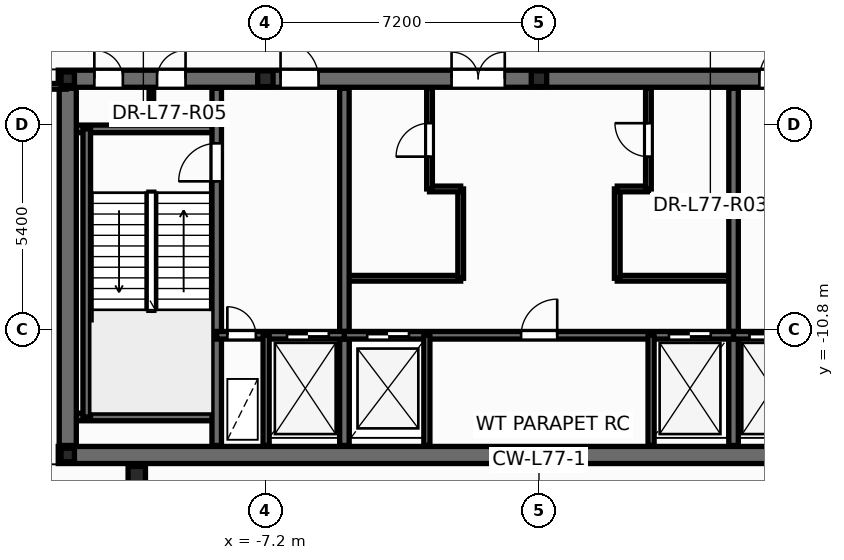
"""IFC4 building model, lengths in metres.
Left out: names, types, materials, properties, quantities, classifications, styles, units other than length and angle.
Written with IfcOpenShell. Run it as: python <this file> out.ifc"""

import sys

from ifc_helpers import new_model, si_unit, direction, frame, frame_2d, origin, origin_2d, place, context, subcontext, project, spatial, rectangle, hollow_circle, i_section, extrude, element, fill, save


model = new_model("IFC4")
c1 = context("Model", 3, precision=1e-05, world=origin(), true_north=direction((0.0, 1.0)))
c2 = subcontext(c1, "Body", "Model", "MODEL_VIEW")
j1 = project(units=[si_unit("LENGTHUNIT", "METRE"), si_unit("PLANEANGLEUNIT", "RADIAN")], contexts=[c1])
p1 = place(None, origin())
s1 = spatial("IfcSite", under=j1, at=p1, CompositionType="ELEMENT")
p2 = place(p1, origin())
s2 = spatial("IfcBuilding", under=s1, at=p2, CompositionType="ELEMENT")
p3 = place(p2, frame((0.0, 0.0, 293.4)))
s3 = spatial("IfcBuildingStorey", under=s2, at=p3, CompositionType="ELEMENT", Elevation=293.4)
p4 = place(p3, frame((-10.583, -14.63, 0.0), z_axis=(0.0, 0.0, 1.0), x_axis=(1.0, 0.0, 0.0)))
e1 = element("IfcColumn", 1, at=p4, inside=s3, PredefinedType="COLUMN", context=c2, shape_type="SweptSolid", body=[
    extrude(hollow_circle(Radius=0.229, WallThickness=0.016, at=origin_2d()), origin(), (0.0, 0.0, 1.0), 4.2),
])
for number, where, z_axis, x_axis in (
    (2, (-12.4, -14.1, 0.0), (0.0, 0.0, 1.0), (1.0, 0.0, 0.0)),
    (3, (-12.4, -4.2, 0.0), (0.0, 0.0, 1.0), (1.0, 0.0, 0.0)),
):
    element("IfcColumn", number, at=place(p3, frame(where, z_axis=z_axis, x_axis=x_axis)), inside=s3, PredefinedType="COLUMN", context=c2, shape_type="SweptSolid", body=[
        extrude(i_section(OverallWidth=0.352, OverallDepth=0.359, WebThickness=0.018, FlangeThickness=0.026, at=origin_2d()), origin(), (0.0, 0.0, 1.0), 4.2),
    ])
for number, where, z_axis, x_axis in (
    (4, (-7.2, -4.2, 0.0), (0.0, 0.0, 1.0), (1.0, 0.0, 0.0)),
    (5, (0.0, -4.2, 0.0), (0.0, 0.0, 1.0), (1.0, 0.0, 0.0)),
):
    element("IfcColumn", number, at=place(p3, frame(where, z_axis=z_axis, x_axis=x_axis)), inside=s3, PredefinedType="PILASTER", context=c2, shape_type="SweptSolid", body=[
        extrude(i_section(OverallWidth=0.405, OverallDepth=0.414, WebThickness=0.022, FlangeThickness=0.032, at=origin_2d()), origin(), (0.0, 0.0, 1.0), 4.2),
    ])
p5 = place(p3, frame((15.285, -4.406, -0.2), z_axis=(0.0, 0.0, 1.0), x_axis=(-0.580762496963, 0.814073044709, 0.0)))
e6 = element("IfcWall", 6, at=p5, inside=s3, PredefinedType="PARAPET", context=c2, shape_type="SweptSolid", body=[
    extrude(rectangle(XDim=23.163, YDim=0.36, at=frame_2d((11.581, 0.0))), origin(), (0.0, 0.0, 1.0), 0.38),
])
p6 = place(p3, frame((-11.155, 1.383, -0.2), z_axis=(0.0, 0.0, 1.0), x_axis=(-0.580765612452, -0.814070822099, 0.0)))
e7 = element("IfcWall", 7, at=p6, inside=s3, PredefinedType="PARAPET", context=c2, shape_type="SweptSolid", body=[
    extrude(rectangle(XDim=17.156, YDim=0.36, at=frame_2d((8.578, 0.0))), origin(), (0.0, 0.0, 1.0), 0.38),
])
p7 = place(p3, frame((-5.12, -9.45, 0.0), z_axis=(0.0, 0.0, 1.0), x_axis=(1.0, 0.0, 0.0)))
e8 = element("IfcWall", 8, at=p7, inside=s3, PredefinedType="PARTITIONING", context=c2, shape_type="SweptSolid", body=[
    extrude(rectangle(XDim=3.06, YDim=0.15, at=frame_2d((1.53, 0.0))), origin(), (0.0, 0.0, 1.0), 3.88),
])
p8 = place(p3, frame((-2.06, -9.45, 0.0), z_axis=(0.0, 0.0, 1.0), x_axis=(0.0, 1.0, 0.0)))
e9 = element("IfcWall", 9, at=p8, inside=s3, PredefinedType="PARTITIONING", context=c2, shape_type="SweptSolid", body=[
    extrude(rectangle(XDim=2.35, YDim=0.15, at=frame_2d((1.175, 0.0))), origin(), (0.0, 0.0, 1.0), 3.88),
])
p9 = place(p3, frame((-2.88, -7.1, 0.0), z_axis=(0.0, 0.0, 1.0), x_axis=(1.0, 0.0, 0.0)))
e10 = element("IfcWall", 10, at=p9, inside=s3, PredefinedType="PARTITIONING", context=c2, shape_type="SweptSolid", body=[
    extrude(rectangle(XDim=0.82, YDim=0.15, at=frame_2d((0.41, 0.0))), origin(), (0.0, 0.0, 1.0), 3.88),
])
p10 = place(p3, frame((-2.88, -7.1, 0.0), z_axis=(0.0, 0.0, 1.0), x_axis=(0.0, 1.0, 0.0)))
e11 = element("IfcWall", 11, at=p10, inside=s3, PredefinedType="PARTITIONING", context=c2, shape_type="SweptSolid", body=[
    extrude(rectangle(XDim=2.65, YDim=0.15, at=frame_2d((1.325, 0.0))), origin(), (0.0, 0.0, 1.0), 3.88),
])
p11 = place(p10, frame((0.85, 0.0, 0.0)))
e12 = element("IfcOpeningElement", 12, at=p11, cuts=e11, PredefinedType="OPENING", context=c2, shape_type="SweptSolid", body=[
    extrude(rectangle(XDim=0.886, YDim=2.104, at=frame_2d((0.44, 1.052))), frame((0.0, 0.085, 0.0), z_axis=(0.0, -1.0, 0.0), x_axis=(1.0, 0.0, 0.0)), (0.0, 0.0, 1.0), 0.17),
])
p12 = place(p3, frame((2.06, -9.45, 0.0), z_axis=(0.0, 0.0, 1.0), x_axis=(1.0, 0.0, 0.0)))
e13 = element("IfcWall", 13, at=p12, inside=s3, PredefinedType="PARTITIONING", context=c2, shape_type="SweptSolid", body=[
    extrude(rectangle(XDim=3.06, YDim=0.15, at=frame_2d((1.53, 0.0))), origin(), (0.0, 0.0, 1.0), 3.88),
])
p13 = place(p3, frame((2.06, -9.45, 0.0), z_axis=(0.0, 0.0, 1.0), x_axis=(0.0, 1.0, 0.0)))
e14 = element("IfcWall", 14, at=p13, inside=s3, PredefinedType="PARTITIONING", context=c2, shape_type="SweptSolid", body=[
    extrude(rectangle(XDim=2.35, YDim=0.15, at=frame_2d((1.175, 0.0))), origin(), (0.0, 0.0, 1.0), 3.88),
])
p14 = place(p3, frame((2.06, -7.1, 0.0), z_axis=(0.0, 0.0, 1.0), x_axis=(1.0, 0.0, 0.0)))
e15 = element("IfcWall", 15, at=p14, inside=s3, PredefinedType="PARTITIONING", context=c2, shape_type="SweptSolid", body=[
    extrude(rectangle(XDim=0.82, YDim=0.15, at=frame_2d((0.41, 0.0))), origin(), (0.0, 0.0, 1.0), 3.88),
])
p15 = place(p3, frame((2.88, -7.1, 0.0), z_axis=(0.0, 0.0, 1.0), x_axis=(0.0, 1.0, 0.0)))
e16 = element("IfcWall", 16, at=p15, inside=s3, PredefinedType="PARTITIONING", context=c2, shape_type="SweptSolid", body=[
    extrude(rectangle(XDim=2.65, YDim=0.15, at=frame_2d((1.325, 0.0))), origin(), (0.0, 0.0, 1.0), 3.88),
])
p16 = place(p15, frame((0.85, 0.0, 0.0)))
e17 = element("IfcOpeningElement", 17, at=p16, cuts=e16, PredefinedType="OPENING", context=c2, shape_type="SweptSolid", body=[
    extrude(rectangle(XDim=0.886, YDim=2.104, at=frame_2d((0.44, 1.052))), frame((0.0, 0.085, 0.0), z_axis=(0.0, -1.0, 0.0), x_axis=(1.0, 0.0, 0.0)), (0.0, 0.0, 1.0), 0.17),
])
p17 = place(p3, frame((-10.2, -5.52, 0.0), z_axis=(0.0, 0.0, 1.0), x_axis=(0.0, 1.0, 0.0)))
e18 = element("IfcWall", 18, at=p17, inside=s3, PredefinedType="PARTITIONING", context=c2, shape_type="SweptSolid", body=[
    extrude(rectangle(XDim=1.12, YDim=0.12, at=frame_2d((0.56, 0.0))), origin(), (0.0, 0.0, 1.0), 3.88),
])
p18 = place(p3, frame((-12.65, -14.1, 0.0), z_axis=(0.0, 0.0, 1.0), x_axis=(1.0, 0.0, 0.0)))
e19 = element("IfcWall", 19, at=p18, inside=s3, PredefinedType="SHEAR", context=c2, shape_type="SweptSolid", body=[
    extrude(rectangle(XDim=25.3, YDim=0.45, at=frame_2d((12.65, 0.0))), origin(), (0.0, 0.0, 1.0), 4.2),
])
p19 = place(p3, frame((-12.65, -4.2, 0.0), z_axis=(0.0, 0.0, 1.0), x_axis=(1.0, 0.0, 0.0)))
e20 = element("IfcWall", 20, at=p19, inside=s3, PredefinedType="SHEAR", context=c2, shape_type="SweptSolid", body=[
    extrude(rectangle(XDim=25.3, YDim=0.45, at=frame_2d((12.65, 0.0))), origin(), (0.0, 0.0, 1.0), 4.2),
])
p20 = place(p19, frame((0.95, 0.0, 0.0)))
e21 = element("IfcOpeningElement", 21, at=p20, cuts=e20, PredefinedType="OPENING", context=c2, shape_type="SweptSolid", body=[
    extrude(rectangle(XDim=0.756, YDim=2.054, at=frame_2d((0.375, 1.027))), frame((0.0, 0.235, 0.0), z_axis=(0.0, -1.0, 0.0), x_axis=(1.0, 0.0, 0.0)), (0.0, 0.0, 1.0), 0.47),
])
p21 = place(p19, frame((2.6, 0.0, 0.0)))
e22 = element("IfcOpeningElement", 22, at=p21, cuts=e20, PredefinedType="OPENING", context=c2, shape_type="SweptSolid", body=[
    extrude(rectangle(XDim=0.756, YDim=2.054, at=frame_2d((0.375, 1.027))), frame((0.0, 0.235, 0.0), z_axis=(0.0, -1.0, 0.0), x_axis=(1.0, 0.0, 0.0)), (0.0, 0.0, 1.0), 0.47),
])
p22 = place(p19, frame((21.85, 0.0, 0.0)))
e23 = element("IfcOpeningElement", 23, at=p22, cuts=e20, PredefinedType="OPENING", context=c2, shape_type="SweptSolid", body=[
    extrude(rectangle(XDim=0.756, YDim=2.054, at=frame_2d((0.375, 1.027))), frame((0.0, 0.235, 0.0), z_axis=(0.0, -1.0, 0.0), x_axis=(1.0, 0.0, 0.0)), (0.0, 0.0, 1.0), 0.47),
])
p23 = place(p19, frame((23.5, 0.0, 0.0)))
e24 = element("IfcOpeningElement", 24, at=p23, cuts=e20, PredefinedType="OPENING", context=c2, shape_type="SweptSolid", body=[
    extrude(rectangle(XDim=0.756, YDim=2.054, at=frame_2d((0.375, 1.027))), frame((0.0, 0.235, 0.0), z_axis=(0.0, -1.0, 0.0), x_axis=(1.0, 0.0, 0.0)), (0.0, 0.0, 1.0), 0.47),
])
p24 = place(p19, frame((5.85, 0.0, 0.0)))
e25 = element("IfcOpeningElement", 25, at=p24, cuts=e20, PredefinedType="OPENING", context=c2, shape_type="SweptSolid", body=[
    extrude(rectangle(XDim=1.006, YDim=2.104, at=frame_2d((0.5, 1.052))), frame((0.0, 0.235, 0.0), z_axis=(0.0, -1.0, 0.0), x_axis=(1.0, 0.0, 0.0)), (0.0, 0.0, 1.0), 0.47),
])
p25 = place(p19, frame((10.35, 0.0, 0.0)))
e26 = element("IfcOpeningElement", 26, at=p25, cuts=e20, PredefinedType="OPENING", context=c2, shape_type="SweptSolid", body=[
    extrude(rectangle(XDim=1.406, YDim=2.154, at=frame_2d((0.7, 1.077))), frame((0.0, 0.235, 0.0), z_axis=(0.0, -1.0, 0.0), x_axis=(1.0, 0.0, 0.0)), (0.0, 0.0, 1.0), 0.47),
])
p26 = place(p19, frame((18.45, 0.0, 0.0)))
e27 = element("IfcOpeningElement", 27, at=p26, cuts=e20, PredefinedType="OPENING", context=c2, shape_type="SweptSolid", body=[
    extrude(rectangle(XDim=1.006, YDim=2.104, at=frame_2d((0.5, 1.052))), frame((0.0, 0.235, 0.0), z_axis=(0.0, -1.0, 0.0), x_axis=(1.0, 0.0, 0.0)), (0.0, 0.0, 1.0), 0.47),
])
for number, where, z_axis, x_axis in (
    (28, (-12.35, -5.52, 0.0), (0.0, 0.0, 1.0), (1.0, 0.0, 0.0)),
    (29, (-12.35, -13.1, 0.0), (0.0, 0.0, 1.0), (1.0, 0.0, 0.0)),
):
    element("IfcWall", number, at=place(p3, frame(where, z_axis=z_axis, x_axis=x_axis)), inside=s3, PredefinedType="SOLIDWALL", context=c2, shape_type="SweptSolid", body=[
        extrude(rectangle(XDim=3.87, YDim=0.2, at=frame_2d((1.935, 0.0))), origin(), (0.0, 0.0, 1.0), 4.2),
    ])
p27 = place(p3, frame((-11.9, -13.1, 0.0), z_axis=(0.0, 0.0, 1.0), x_axis=(0.0, 1.0, 0.0)))
e30 = element("IfcWall", 30, at=p27, inside=s3, PredefinedType="SOLIDWALL", context=c2, shape_type="SweptSolid", body=[
    extrude(rectangle(XDim=7.58, YDim=0.2, at=frame_2d((3.79, 0.0))), origin(), (0.0, 0.0, 1.0), 4.2),
])
p28 = place(p3, frame((-8.48, -13.85, 0.0), z_axis=(0.0, 0.0, 1.0), x_axis=(0.0, 1.0, 0.0)))
e31 = element("IfcWall", 31, at=p28, inside=s3, PredefinedType="SHEAR", context=c2, shape_type="SweptSolid", body=[
    extrude(rectangle(XDim=9.4, YDim=0.25, at=frame_2d((4.7, 0.0))), origin(), (0.0, 0.0, 1.0), 4.2),
])
p29 = place(p28, frame((6.95, 0.0, 0.0)))
e32 = element("IfcOpeningElement", 32, at=p29, cuts=e31, PredefinedType="OPENING", context=c2, shape_type="SweptSolid", body=[
    extrude(rectangle(XDim=1.006, YDim=2.104, at=frame_2d((0.5, 1.052))), frame((0.0, 0.135, 0.0), z_axis=(0.0, -1.0, 0.0), x_axis=(1.0, 0.0, 0.0)), (0.0, 0.0, 1.0), 0.27),
])
for number, where, z_axis, x_axis in (
    (33, (-5.12, -13.85, 0.0), (0.0, 0.0, 1.0), (0.0, 1.0, 0.0)),
    (34, (5.12, -13.85, 0.0), (0.0, 0.0, 1.0), (0.0, 1.0, 0.0)),
):
    element("IfcWall", number, at=place(p3, frame(where, z_axis=z_axis, x_axis=x_axis)), inside=s3, PredefinedType="SHEAR", context=c2, shape_type="SweptSolid", body=[
        extrude(rectangle(XDim=9.4, YDim=0.25, at=frame_2d((4.7, 0.0))), origin(), (0.0, 0.0, 1.0), 4.2),
    ])
p30 = place(p3, frame((-8.48, -10.95, 0.0), z_axis=(0.0, 0.0, 1.0), x_axis=(1.0, 0.0, 0.0)))
e35 = element("IfcWall", 35, at=p30, inside=s3, PredefinedType="SOLIDWALL", context=c2, shape_type="SweptSolid", body=[
    extrude(rectangle(XDim=3.36, YDim=0.2, at=frame_2d((1.68, 0.0))), origin(), (0.0, 0.0, 1.0), 4.2),
])
p31 = place(p30, frame((0.28, 0.0, 0.0)))
e36 = element("IfcOpeningElement", 36, at=p31, cuts=e35, PredefinedType="OPENING", context=c2, shape_type="SweptSolid", body=[
    extrude(rectangle(XDim=0.756, YDim=2.054, at=frame_2d((0.375, 1.027))), frame((0.0, 0.11, 0.0), z_axis=(0.0, -1.0, 0.0), x_axis=(1.0, 0.0, 0.0)), (0.0, 0.0, 1.0), 0.22),
])
p32 = place(p30, frame((1.85, 0.0, 0.0)))
e37 = element("IfcOpeningElement", 37, at=p32, cuts=e35, PredefinedType="OPENING", context=c2, shape_type="SweptSolid", body=[
    extrude(rectangle(XDim=1.106, YDim=2.104, at=frame_2d((0.55, 1.052))), frame((0.0, 0.11, 0.0), z_axis=(0.0, -1.0, 0.0), x_axis=(1.0, 0.0, 0.0)), (0.0, 0.0, 1.0), 0.22),
])
p33 = place(p3, frame((-5.12, -10.95, 0.0), z_axis=(0.0, 0.0, 1.0), x_axis=(1.0, 0.0, 0.0)))
e38 = element("IfcWall", 38, at=p33, inside=s3, PredefinedType="SOLIDWALL", context=c2, shape_type="SweptSolid", body=[
    extrude(rectangle(XDim=10.24, YDim=0.2, at=frame_2d((5.12, 0.0))), origin(), (0.0, 0.0, 1.0), 4.2),
])
p34 = place(p33, frame((0.6, 0.0, 0.0)))
e39 = element("IfcOpeningElement", 39, at=p34, cuts=e38, PredefinedType="OPENING", context=c2, shape_type="SweptSolid", body=[
    extrude(rectangle(XDim=1.106, YDim=2.104, at=frame_2d((0.55, 1.052))), frame((0.0, 0.11, 0.0), z_axis=(0.0, -1.0, 0.0), x_axis=(1.0, 0.0, 0.0)), (0.0, 0.0, 1.0), 0.22),
])
p35 = place(p33, frame((4.65, 0.0, 0.0)))
e40 = element("IfcOpeningElement", 40, at=p35, cuts=e38, PredefinedType="OPENING", context=c2, shape_type="SweptSolid", body=[
    extrude(rectangle(XDim=0.956, YDim=2.104, at=frame_2d((0.475, 1.052))), frame((0.0, 0.11, 0.0), z_axis=(0.0, -1.0, 0.0), x_axis=(1.0, 0.0, 0.0)), (0.0, 0.0, 1.0), 0.22),
])
p36 = place(p33, frame((8.54, 0.0, 0.0)))
e41 = element("IfcOpeningElement", 41, at=p36, cuts=e38, PredefinedType="OPENING", context=c2, shape_type="SweptSolid", body=[
    extrude(rectangle(XDim=1.106, YDim=2.104, at=frame_2d((0.55, 1.052))), frame((0.0, 0.11, 0.0), z_axis=(0.0, -1.0, 0.0), x_axis=(1.0, 0.0, 0.0)), (0.0, 0.0, 1.0), 0.22),
])
p37 = place(p3, frame((5.12, -10.95, 0.0), z_axis=(0.0, 0.0, 1.0), x_axis=(1.0, 0.0, 0.0)))
e42 = element("IfcWall", 42, at=p37, inside=s3, PredefinedType="SOLIDWALL", context=c2, shape_type="SweptSolid", body=[
    extrude(rectangle(XDim=3.36, YDim=0.2, at=frame_2d((1.68, 0.0))), origin(), (0.0, 0.0, 1.0), 4.2),
])
p38 = place(p37, frame((0.42, 0.0, 0.0)))
e43 = element("IfcOpeningElement", 43, at=p38, cuts=e42, PredefinedType="OPENING", context=c2, shape_type="SweptSolid", body=[
    extrude(rectangle(XDim=1.106, YDim=2.104, at=frame_2d((0.55, 1.052))), frame((0.0, 0.11, 0.0), z_axis=(0.0, -1.0, 0.0), x_axis=(1.0, 0.0, 0.0)), (0.0, 0.0, 1.0), 0.22),
])
p39 = place(p37, frame((2.3, 0.0, 0.0)))
e44 = element("IfcOpeningElement", 44, at=p39, cuts=e42, PredefinedType="OPENING", context=c2, shape_type="SweptSolid", body=[
    extrude(rectangle(XDim=0.756, YDim=2.054, at=frame_2d((0.375, 1.027))), frame((0.0, 0.11, 0.0), z_axis=(0.0, -1.0, 0.0), x_axis=(1.0, 0.0, 0.0)), (0.0, 0.0, 1.0), 0.22),
])
for number, where, z_axis, x_axis in (
    (45, (-7.18, -13.85, 0.0), (0.0, 0.0, 1.0), (0.0, 1.0, 0.0)),
    (46, (-2.95, -13.85, 0.0), (0.0, 0.0, 1.0), (0.0, 1.0, 0.0)),
    (47, (2.95, -13.85, 0.0), (0.0, 0.0, 1.0), (0.0, 1.0, 0.0)),
):
    element("IfcWall", number, at=place(p3, frame(where, z_axis=z_axis, x_axis=x_axis)), inside=s3, PredefinedType="PARTITIONING", context=c2, shape_type="SweptSolid", body=[
        extrude(rectangle(XDim=2.9, YDim=0.16, at=frame_2d((1.45, 0.0))), origin(), (0.0, 0.0, 1.0), 3.105),
    ])
p40 = place(p3, frame((-12.4, -13.85, 0.0), z_axis=(0.0, 0.0, 1.0), x_axis=(0.0, 1.0, 0.0)))
e48 = element("IfcWall", 48, at=p40, inside=s3, PredefinedType="SHEAR", context=c2, shape_type="SweptSolid", body=[
    extrude(rectangle(XDim=9.4, YDim=0.45, at=frame_2d((4.7, 0.0))), origin(), (0.0, 0.0, 1.0), 4.2),
])
p41 = place(p3, frame((-15.083, -4.4, 0.0), z_axis=(0.0, 0.0, 1.0), x_axis=(1.0, 0.0, 0.0)))
e49 = element("IfcWall", 49, at=p41, inside=s3, PredefinedType="PARTITIONING", context=c2, shape_type="SweptSolid", body=[
    extrude(rectangle(XDim=2.644, YDim=0.15, at=frame_2d((1.322, 0.0))), origin(), (0.0, 0.0, 1.0), 2.855),
])
p42 = place(p41, frame((0.1, 0.0, 0.0)))
e50 = element("IfcOpeningElement", 50, at=p42, cuts=e49, PredefinedType="OPENING", context=c2, shape_type="SweptSolid", body=[
    extrude(rectangle(XDim=0.906, YDim=2.104, at=frame_2d((0.45, 1.052))), frame((0.0, 0.085, 0.0), z_axis=(0.0, -1.0, 0.0), x_axis=(1.0, 0.0, 0.0)), (0.0, 0.0, 1.0), 0.17),
])
p43 = place(p11, origin())
e51 = element("IfcDoor", 51, at=p43, inside=s3, OperationType="SINGLE_SWING_LEFT", PredefinedType="DOOR", context=c2, shape_type="SweptSolid", body=[
    extrude(rectangle(XDim=0.88, YDim=2.1, at=frame_2d((0.44, 1.05))), frame((0.0, 0.025, 0.0), z_axis=(0.0, -1.0, 0.0), x_axis=(1.0, 0.0, 0.0)), (0.0, 0.0, 1.0), 0.05),
])
fill(e12, e51)
p44 = place(p16, origin())
e52 = element("IfcDoor", 52, at=p44, inside=s3, OperationType="SINGLE_SWING_RIGHT", PredefinedType="DOOR", context=c2, shape_type="SweptSolid", body=[
    extrude(rectangle(XDim=0.88, YDim=2.1, at=frame_2d((0.44, 1.05))), frame((0.0, 0.025, 0.0), z_axis=(0.0, -1.0, 0.0), x_axis=(1.0, 0.0, 0.0)), (0.0, 0.0, 1.0), 0.05),
])
fill(e17, e52)
p45 = place(p29, origin())
e53 = element("IfcDoor", 53, at=p45, inside=s3, OperationType="SINGLE_SWING_LEFT", PredefinedType="DOOR", context=c2, shape_type="SweptSolid", body=[
    extrude(rectangle(XDim=1.0, YDim=2.1, at=frame_2d((0.5, 1.05))), frame((0.0, 0.025, 0.0), z_axis=(0.0, -1.0, 0.0), x_axis=(1.0, 0.0, 0.0)), (0.0, 0.0, 1.0), 0.05),
])
fill(e32, e53)
p46 = place(p31, origin())
e54 = element("IfcDoor", 54, at=p46, inside=s3, OperationType="SINGLE_SWING_LEFT", PredefinedType="DOOR", context=c2, shape_type="SweptSolid", body=[
    extrude(rectangle(XDim=0.75, YDim=2.05, at=frame_2d((0.375, 1.025))), frame((0.0, 0.025, 0.0), z_axis=(0.0, -1.0, 0.0), x_axis=(1.0, 0.0, 0.0)), (0.0, 0.0, 1.0), 0.05),
])
fill(e36, e54)
p47 = place(p32, origin())
e55 = element("IfcDoor", 55, at=p47, inside=s3, OperationType="DOUBLE_DOOR_SLIDING", PredefinedType="DOOR", context=c2, shape_type="SweptSolid", body=[
    extrude(rectangle(XDim=1.1, YDim=2.1, at=frame_2d((0.55, 1.05))), frame((0.0, 0.025, 0.0), z_axis=(0.0, -1.0, 0.0), x_axis=(1.0, 0.0, 0.0)), (0.0, 0.0, 1.0), 0.05),
])
fill(e37, e55)
p48 = place(p38, origin())
e56 = element("IfcDoor", 56, at=p48, inside=s3, OperationType="DOUBLE_DOOR_SLIDING", PredefinedType="DOOR", context=c2, shape_type="SweptSolid", body=[
    extrude(rectangle(XDim=1.1, YDim=2.1, at=frame_2d((0.55, 1.05))), frame((0.0, 0.025, 0.0), z_axis=(0.0, -1.0, 0.0), x_axis=(1.0, 0.0, 0.0)), (0.0, 0.0, 1.0), 0.05),
])
fill(e43, e56)
p49 = place(p34, origin())
e57 = element("IfcDoor", 57, at=p49, inside=s3, OperationType="DOUBLE_DOOR_SLIDING", PredefinedType="DOOR", context=c2, shape_type="SweptSolid", body=[
    extrude(rectangle(XDim=1.1, YDim=2.1, at=frame_2d((0.55, 1.05))), frame((0.0, 0.025, 0.0), z_axis=(0.0, -1.0, 0.0), x_axis=(1.0, 0.0, 0.0)), (0.0, 0.0, 1.0), 0.05),
])
fill(e39, e57)
p50 = place(p35, origin())
e58 = element("IfcDoor", 58, at=p50, inside=s3, OperationType="SINGLE_SWING_RIGHT", PredefinedType="DOOR", context=c2, shape_type="SweptSolid", body=[
    extrude(rectangle(XDim=0.95, YDim=2.1, at=frame_2d((0.475, 1.05))), frame((0.0, 0.025, 0.0), z_axis=(0.0, -1.0, 0.0), x_axis=(1.0, 0.0, 0.0)), (0.0, 0.0, 1.0), 0.05),
])
fill(e40, e58)
p51 = place(p36, origin())
e59 = element("IfcDoor", 59, at=p51, inside=s3, OperationType="DOUBLE_DOOR_SLIDING", PredefinedType="DOOR", context=c2, shape_type="SweptSolid", body=[
    extrude(rectangle(XDim=1.1, YDim=2.1, at=frame_2d((0.55, 1.05))), frame((0.0, 0.025, 0.0), z_axis=(0.0, -1.0, 0.0), x_axis=(1.0, 0.0, 0.0)), (0.0, 0.0, 1.0), 0.05),
])
fill(e41, e59)
p52 = place(p20, origin())
e60 = element("IfcDoor", 60, at=p52, inside=s3, OperationType="SINGLE_SWING_LEFT", PredefinedType="DOOR", context=c2, shape_type="SweptSolid", body=[
    extrude(rectangle(XDim=0.75, YDim=2.05, at=frame_2d((0.375, 1.025))), frame((0.0, 0.025, 0.0), z_axis=(0.0, -1.0, 0.0), x_axis=(1.0, 0.0, 0.0)), (0.0, 0.0, 1.0), 0.05),
])
fill(e21, e60)
p53 = place(p21, origin())
e61 = element("IfcDoor", 61, at=p53, inside=s3, OperationType="SINGLE_SWING_RIGHT", PredefinedType="DOOR", context=c2, shape_type="SweptSolid", body=[
    extrude(rectangle(XDim=0.75, YDim=2.05, at=frame_2d((0.375, 1.025))), frame((0.0, 0.025, 0.0), z_axis=(0.0, -1.0, 0.0), x_axis=(1.0, 0.0, 0.0)), (0.0, 0.0, 1.0), 0.05),
])
fill(e22, e61)
p54 = place(p24, origin())
e62 = element("IfcDoor", 62, at=p54, inside=s3, OperationType="SINGLE_SWING_LEFT", PredefinedType="DOOR", context=c2, shape_type="SweptSolid", body=[
    extrude(rectangle(XDim=1.0, YDim=2.1, at=frame_2d((0.5, 1.05))), frame((0.0, 0.025, 0.0), z_axis=(0.0, -1.0, 0.0), x_axis=(1.0, 0.0, 0.0)), (0.0, 0.0, 1.0), 0.05),
])
fill(e25, e62)
p55 = place(p25, origin())
e63 = element("IfcDoor", 63, at=p55, inside=s3, OperationType="DOUBLE_DOOR_SINGLE_SWING", PredefinedType="DOOR", context=c2, shape_type="SweptSolid", body=[
    extrude(rectangle(XDim=1.4, YDim=2.15, at=frame_2d((0.7, 1.075))), frame((0.0, 0.025, 0.0), z_axis=(0.0, -1.0, 0.0), x_axis=(1.0, 0.0, 0.0)), (0.0, 0.0, 1.0), 0.05),
])
fill(e26, e63)
p56 = place(p26, origin())
e64 = element("IfcDoor", 64, at=p56, inside=s3, OperationType="SINGLE_SWING_RIGHT", PredefinedType="DOOR", context=c2, shape_type="SweptSolid", body=[
    extrude(rectangle(XDim=1.0, YDim=2.1, at=frame_2d((0.5, 1.05))), frame((0.0, 0.025, 0.0), z_axis=(0.0, -1.0, 0.0), x_axis=(1.0, 0.0, 0.0)), (0.0, 0.0, 1.0), 0.05),
])
fill(e27, e64)
save(model, sys.argv[1])
